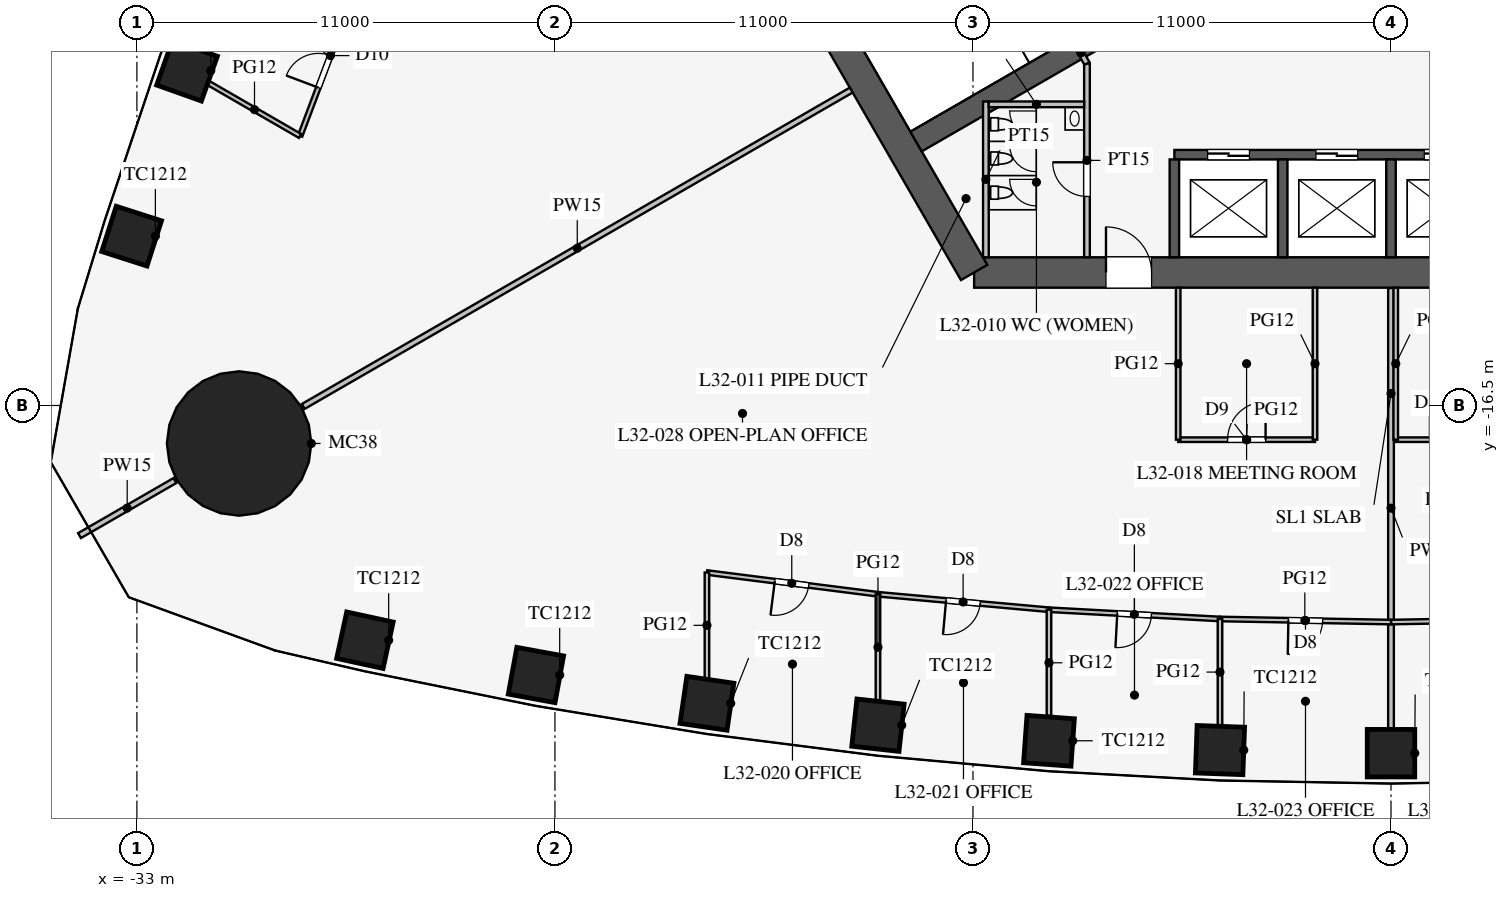
"""IFC4 building model, lengths in metres.
Left out: names, types, materials, properties, quantities, classifications, styles, units other than length and angle.
Written with IfcOpenShell. Run it as: python <this file> out.ifc"""

import sys

from ifc_helpers import new_model, si_unit, direction, frame, frame_2d, origin, origin_2d, place, context, subcontext, project, spatial, rectangle, circle, extrude, element, fill, save


model = new_model("IFC4")
c1 = context("Model", 3, precision=1e-05, world=origin(), true_north=direction((0.0, 1.0)))
c2 = subcontext(c1, "Body", "Model", "MODEL_VIEW")
j1 = project(units=[si_unit("LENGTHUNIT", "METRE"), si_unit("PLANEANGLEUNIT", "RADIAN")], contexts=[c1])
p1 = place(None, origin())
s1 = spatial("IfcSite", under=j1, at=p1, CompositionType="ELEMENT")
p2 = place(p1, origin())
s2 = spatial("IfcBuilding", under=s1, at=p2, CompositionType="ELEMENT")
p3 = place(p2, frame((0.0, 0.0, 140.9)))
s3 = spatial("IfcBuildingStorey", under=s2, at=p3, CompositionType="ELEMENT", Elevation=140.9)
for number, where, z_axis, x_axis in (
    (1, (-27.0, -22.677, 0.0), (0.0, 0.0, 1.0), (0.977, -0.212, 0.0)),
    (2, (-22.5, -23.593, 0.0), (0.0, 0.0, 1.0), (0.984, -0.18, 0.0)),
    (3, (-18.0, -24.337, 0.0), (0.0, 0.0, 1.0), (0.99, -0.144, 0.0)),
    (4, (-13.5, -24.913, 0.0), (0.0, 0.0, 1.0), (0.994, -0.108, 0.0)),
    (5, (-9.0, -25.323, 0.0), (0.0, 0.0, 1.0), (0.997, -0.072, 0.0)),
    (6, (-4.5, -25.568, 0.0), (0.0, 0.0, 1.0), (0.999, -0.036, 0.0)),
    (7, (0.0, -25.65, 0.0), (0.0, 0.0, 1.0), (1.0, 0.0, 0.0)),
    (8, (-31.682, -7.689, 0.0), (0.0, 0.0, 1.0), (-0.336, -0.942, 0.0)),
    (9, (-33.139, -12.044, 0.0), (0.0, 0.0, 1.0), (-0.305, -0.952, 0.0)),
):
    element("IfcColumn", number, at=place(p3, frame(where, z_axis=z_axis, x_axis=x_axis)), inside=s3, PredefinedType="COLUMN", context=c2, shape_type="SweptSolid", body=[
        extrude(rectangle(XDim=1.25, YDim=1.25, at=origin_2d()), origin(), (0.0, 0.0, 1.0), 4.2),
    ])
p4 = place(p3, frame((-30.311, -17.5, 0.0), z_axis=(0.0, 0.0, 1.0), x_axis=(1.0, 0.0, 0.0)))
e10 = element("IfcColumn", 10, at=p4, inside=s3, PredefinedType="COLUMN", context=c2, shape_type="SweptSolid", body=[
    extrude(circle(Radius=1.9, at=origin_2d()), origin(), (0.0, 0.0, 1.0), 4.2),
])
p5 = place(p3, frame((-10.97, -13.0, 0.0), z_axis=(0.0, 0.0, 1.0), x_axis=(1.0, 0.0, 0.0)))
e11 = element("IfcWall", 11, at=p5, inside=s3, PredefinedType="SHEAR", context=c2, shape_type="SweptSolid", body=[
    extrude(rectangle(XDim=21.939, YDim=0.8, at=frame_2d((10.97, 0.0))), origin(), (0.0, 0.0, 1.0), 4.2),
])
p6 = place(p5, frame((17.27, 0.0, 0.0)))
e12 = element("IfcOpeningElement", 12, at=p6, cuts=e11, PredefinedType="OPENING", context=c2, shape_type="SweptSolid", body=[
    extrude(rectangle(XDim=1.2, YDim=2.1, at=frame_2d((0.6, 1.05))), frame((0.0, 0.41, 0.0), z_axis=(0.0, -1.0, 0.0), x_axis=(1.0, 0.0, 0.0)), (0.0, 0.0, 1.0), 0.82),
])
p7 = place(p5, frame((3.47, 0.0, 0.0)))
e13 = element("IfcOpeningElement", 13, at=p7, cuts=e11, PredefinedType="OPENING", context=c2, shape_type="SweptSolid", body=[
    extrude(rectangle(XDim=1.2, YDim=2.1, at=frame_2d((0.6, 1.05))), frame((0.0, 0.41, 0.0), z_axis=(0.0, -1.0, 0.0), x_axis=(1.0, 0.0, 0.0)), (0.0, 0.0, 1.0), 0.82),
])
p8 = place(p3, frame((-16.743, -3.0, 0.0), z_axis=(0.0, 0.0, 1.0), x_axis=(0.499995765644, -0.866027848477, 0.0)))
e14 = element("IfcWall", 14, at=p8, inside=s3, PredefinedType="SHEAR", context=c2, shape_type="SweptSolid", body=[
    extrude(rectangle(XDim=11.547, YDim=0.8, at=frame_2d((5.773, 0.0))), origin(), (0.0, 0.0, 1.0), 4.2),
])
p9 = place(p3, frame((-5.7, -9.9, 0.0), z_axis=(0.0, 0.0, 1.0), x_axis=(1.0, 0.0, 0.0)))
e15 = element("IfcWall", 15, at=p9, inside=s3, PredefinedType="SHEAR", context=c2, shape_type="SweptSolid", body=[
    extrude(rectangle(XDim=11.4, YDim=0.25, at=frame_2d((5.7, 0.0))), origin(), (0.0, 0.0, 1.0), 4.2),
])
p10 = place(p9, frame((0.875, 0.0, 0.0)))
e16 = element("IfcOpeningElement", 16, at=p10, cuts=e15, PredefinedType="OPENING", context=c2, shape_type="SweptSolid", body=[
    extrude(rectangle(XDim=1.1, YDim=2.2, at=frame_2d((0.55, 1.1))), frame((0.0, 0.135, 0.0), z_axis=(0.0, -1.0, 0.0), x_axis=(1.0, 0.0, 0.0)), (0.0, 0.0, 1.0), 0.27),
])
p11 = place(p9, frame((3.725, 0.0, 0.0)))
e17 = element("IfcOpeningElement", 17, at=p11, cuts=e15, PredefinedType="OPENING", context=c2, shape_type="SweptSolid", body=[
    extrude(rectangle(XDim=1.1, YDim=2.2, at=frame_2d((0.55, 1.1))), frame((0.0, 0.135, 0.0), z_axis=(0.0, -1.0, 0.0), x_axis=(1.0, 0.0, 0.0)), (0.0, 0.0, 1.0), 0.27),
])
p12 = place(p9, frame((6.575, 0.0, 0.0)))
e18 = element("IfcOpeningElement", 18, at=p12, cuts=e15, PredefinedType="OPENING", context=c2, shape_type="SweptSolid", body=[
    extrude(rectangle(XDim=1.1, YDim=2.2, at=frame_2d((0.55, 1.1))), frame((0.0, 0.135, 0.0), z_axis=(0.0, -1.0, 0.0), x_axis=(1.0, 0.0, 0.0)), (0.0, 0.0, 1.0), 0.27),
])
p13 = place(p9, frame((9.425, 0.0, 0.0)))
e19 = element("IfcOpeningElement", 19, at=p13, cuts=e15, PredefinedType="OPENING", context=c2, shape_type="SweptSolid", body=[
    extrude(rectangle(XDim=1.1, YDim=2.2, at=frame_2d((0.55, 1.1))), frame((0.0, 0.135, 0.0), z_axis=(0.0, -1.0, 0.0), x_axis=(1.0, 0.0, 0.0)), (0.0, 0.0, 1.0), 0.27),
])
for number, where, z_axis, x_axis in (
    (20, (-5.7, -10.025, 0.0), (0.0, 0.0, 1.0), (0.0, -1.0, 0.0)),
    (21, (-2.85, -10.025, 0.0), (0.0, 0.0, 1.0), (0.0, -1.0, 0.0)),
    (22, (0.0, -10.025, 0.0), (0.0, 0.0, 1.0), (0.0, -1.0, 0.0)),
):
    element("IfcWall", number, at=place(p3, frame(where, z_axis=z_axis, x_axis=x_axis)), inside=s3, PredefinedType="SHEAR", context=c2, shape_type="SweptSolid", body=[
        extrude(rectangle(XDim=2.575, YDim=0.25, at=frame_2d((1.288, 0.0))), origin(), (0.0, 0.0, 1.0), 4.2),
    ])
p14 = place(p3, frame((-4.638, -5.016, 0.0), z_axis=(0.0, 0.0, 1.0), x_axis=(-0.866019375473, -0.500010441196, 0.0)))
e23 = element("IfcWall", 23, at=p14, inside=s3, PredefinedType="SHEAR", context=c2, shape_type="SweptSolid", body=[
    extrude(rectangle(XDim=9.075, YDim=0.6, at=frame_2d((4.538, 0.0))), origin(), (0.0, 0.0, 1.0), 4.2),
])
p15 = place(p3, frame((-8.0, -7.5, 0.0), z_axis=(0.0, 0.0, 1.0), x_axis=(0.0, -1.0, 0.0)))
e24 = element("IfcWall", 24, at=p15, inside=s3, PredefinedType="PARTITIONING", context=c2, shape_type="SweptSolid", body=[
    extrude(rectangle(XDim=5.1, YDim=0.15, at=frame_2d((2.55, 0.0))), origin(), (0.0, 0.0, 1.0), 4.0),
])
p16 = place(p15, frame((2.6, 0.0, 0.0)))
e25 = element("IfcOpeningElement", 25, at=p16, cuts=e24, PredefinedType="OPENING", context=c2, shape_type="SweptSolid", body=[
    extrude(rectangle(XDim=0.9, YDim=2.1, at=frame_2d((0.45, 1.05))), frame((0.0, 0.085, 0.0), z_axis=(0.0, -1.0, 0.0), x_axis=(1.0, 0.0, 0.0)), (0.0, 0.0, 1.0), 0.17),
])
p17 = place(p3, frame((-8.0, -7.5, 0.0), z_axis=(0.0, 0.0, 1.0), x_axis=(-0.499842556608, 0.866116284689, 0.0)))
e26 = element("IfcWall", 26, at=p17, inside=s3, PredefinedType="PARTITIONING", context=c2, shape_type="SweptSolid", body=[
    extrude(rectangle(XDim=0.645, YDim=0.15, at=frame_2d((0.323, 0.0))), origin(), (0.0, 0.0, 1.0), 4.0),
])
p18 = place(p3, frame((-10.66, -8.5, 0.0), z_axis=(0.0, 0.0, 1.0), x_axis=(0.0, -1.0, 0.0)))
e27 = element("IfcWall", 27, at=p18, inside=s3, PredefinedType="PARTITIONING", context=c2, shape_type="SweptSolid", body=[
    extrude(rectangle(XDim=4.1, YDim=0.15, at=frame_2d((2.05, 0.0))), origin(), (0.0, 0.0, 1.0), 4.0),
])
p19 = place(p3, frame((-8.075, -8.575, 0.0), z_axis=(0.0, 0.0, 1.0), x_axis=(-1.0, 0.0, 0.0)))
e28 = element("IfcWall", 28, at=p19, inside=s3, PredefinedType="PARTITIONING", context=c2, shape_type="SweptSolid", body=[
    extrude(rectangle(XDim=2.51, YDim=0.15, at=frame_2d((1.255, 0.0))), origin(), (0.0, 0.0, 1.0), 4.0),
])
p20 = place(p3, frame((-14.203, -8.2, 0.0), z_axis=(0.0, 0.0, 1.0), x_axis=(-0.866024668836, -0.500001272966, 0.0)))
e29 = element("IfcWall", 29, at=p20, inside=s3, PredefinedType="PARTITIONING", context=c2, shape_type="SweptSolid", body=[
    extrude(rectangle(XDim=16.65, YDim=0.15, at=frame_2d((8.325, 0.0))), origin(), (0.0, 0.0, 1.0), 2.3),
])
p21 = place(p3, frame((-32.0, -18.475, 0.0), z_axis=(0.0, 0.0, 1.0), x_axis=(-0.866042548026, -0.499970304126, 0.0)))
e30 = element("IfcWall", 30, at=p21, inside=s3, PredefinedType="PARTITIONING", context=c2, shape_type="SweptSolid", body=[
    extrude(rectangle(XDim=2.899, YDim=0.15, at=frame_2d((1.45, 0.0))), origin(), (0.0, 0.0, 1.0), 2.3),
])
p22 = place(p3, frame((0.0, -13.41, 0.0), z_axis=(0.0, 0.0, 1.0), x_axis=(0.0, -1.0, 0.0)))
e31 = element("IfcWall", 31, at=p22, inside=s3, PredefinedType="PARTITIONING", context=c2, shape_type="SweptSolid", body=[
    extrude(rectangle(XDim=11.585, YDim=0.15, at=frame_2d((5.792, 0.0))), origin(), (0.0, 0.0, 1.0), 3.2),
])
p23 = place(p3, frame((0.125, -17.4, 0.0), z_axis=(0.0, 0.0, 1.0), x_axis=(1.0, 0.0, 0.0)))
e32 = element("IfcWall", 32, at=p23, inside=s3, PredefinedType="PARTITIONING", context=c2, shape_type="SweptSolid", body=[
    extrude(rectangle(XDim=2.7, YDim=0.12, at=frame_2d((1.35, 0.0))), origin(), (0.0, 0.0, 1.0), 2.9),
])
p24 = place(p23, frame((0.9, 0.0, 0.15)))
e33 = element("IfcOpeningElement", 33, at=p24, cuts=e32, PredefinedType="OPENING", context=c2, shape_type="SweptSolid", body=[
    extrude(rectangle(XDim=0.9, YDim=2.1, at=frame_2d((0.45, 1.05))), frame((0.0, 0.07, 0.0), z_axis=(0.0, -1.0, 0.0), x_axis=(1.0, 0.0, 0.0)), (0.0, 0.0, 1.0), 0.14),
])
p25 = place(p3, frame((-5.6, -17.4, 0.0), z_axis=(0.0, 0.0, 1.0), x_axis=(1.0, 0.0, 0.0)))
e34 = element("IfcWall", 34, at=p25, inside=s3, PredefinedType="PARTITIONING", context=c2, shape_type="SweptSolid", body=[
    extrude(rectangle(XDim=3.6, YDim=0.12, at=frame_2d((1.8, 0.0))), origin(), (0.0, 0.0, 1.0), 2.9),
])
p26 = place(p25, frame((1.3, 0.0, 0.15)))
e35 = element("IfcOpeningElement", 35, at=p26, cuts=e34, PredefinedType="OPENING", context=c2, shape_type="SweptSolid", body=[
    extrude(rectangle(XDim=1.0, YDim=2.1, at=frame_2d((0.5, 1.05))), frame((0.0, 0.07, 0.0), z_axis=(0.0, -1.0, 0.0), x_axis=(1.0, 0.0, 0.0)), (0.0, 0.0, 1.0), 0.14),
])
for number, where, z_axis, x_axis in (
    (36, (0.125, -13.4, 0.0), (0.0, 0.0, 1.0), (0.0, -1.0, 0.0)),
    (37, (-2.0, -13.4, 0.0), (0.0, 0.0, 1.0), (0.0, -1.0, 0.0)),
    (38, (-5.6, -13.4, 0.0), (0.0, 0.0, 1.0), (0.0, -1.0, 0.0)),
):
    element("IfcWall", number, at=place(p3, frame(where, z_axis=z_axis, x_axis=x_axis)), inside=s3, PredefinedType="PARTITIONING", context=c2, shape_type="SweptSolid", body=[
        extrude(rectangle(XDim=4.0, YDim=0.12, at=frame_2d((2.0, 0.0))), origin(), (0.0, 0.0, 1.0), 2.9),
    ])
p27 = place(p3, frame((0.0, -22.2, 0.0), z_axis=(0.0, 0.0, 1.0), x_axis=(0.999837820638, 0.018009231578, 0.0)))
e39 = element("IfcWall", 39, at=p27, inside=s3, PredefinedType="PARTITIONING", context=c2, shape_type="SweptSolid", body=[
    extrude(rectangle(XDim=4.501, YDim=0.12, at=frame_2d((2.25, 0.0))), origin(), (0.0, 0.0, 1.0), 2.9),
])
p28 = place(p27, frame((1.8, 0.0, 0.15)))
e40 = element("IfcOpeningElement", 40, at=p28, cuts=e39, PredefinedType="OPENING", context=c2, shape_type="SweptSolid", body=[
    extrude(rectangle(XDim=0.9, YDim=2.1, at=frame_2d((0.45, 1.05))), frame((0.0, 0.07, 0.0), z_axis=(0.0, -1.0, 0.0), x_axis=(1.0, 0.0, 0.0)), (0.0, 0.0, 1.0), 0.14),
])
p29 = place(p3, frame((-13.5, -21.468, 0.0), z_axis=(0.0, 0.0, 1.0), x_axis=(0.995930325215, -0.090126507295, 0.0)))
e41 = element("IfcWall", 41, at=p29, inside=s3, PredefinedType="PARTITIONING", context=c2, shape_type="SweptSolid", body=[
    extrude(rectangle(XDim=4.518, YDim=0.12, at=frame_2d((2.259, 0.0))), origin(), (0.0, 0.0, 1.0), 2.9),
])
p30 = place(p29, frame((1.8, 0.0, 0.15)))
e42 = element("IfcOpeningElement", 42, at=p30, cuts=e41, PredefinedType="OPENING", context=c2, shape_type="SweptSolid", body=[
    extrude(rectangle(XDim=0.9, YDim=2.1, at=frame_2d((0.45, 1.05))), frame((0.0, 0.07, 0.0), z_axis=(0.0, -1.0, 0.0), x_axis=(1.0, 0.0, 0.0)), (0.0, 0.0, 1.0), 0.14),
])
p31 = place(p3, frame((-18.0, -20.896, 0.0), z_axis=(0.0, 0.0, 1.0), x_axis=(0.992010652594, -0.12615413247, 0.0)))
e43 = element("IfcWall", 43, at=p31, inside=s3, PredefinedType="PARTITIONING", context=c2, shape_type="SweptSolid", body=[
    extrude(rectangle(XDim=4.536, YDim=0.12, at=frame_2d((2.268, 0.0))), origin(), (0.0, 0.0, 1.0), 2.9),
])
p32 = place(p31, frame((1.8, 0.0, 0.15)))
e44 = element("IfcOpeningElement", 44, at=p32, cuts=e43, PredefinedType="OPENING", context=c2, shape_type="SweptSolid", body=[
    extrude(rectangle(XDim=0.9, YDim=2.1, at=frame_2d((0.45, 1.05))), frame((0.0, 0.07, 0.0), z_axis=(0.0, -1.0, 0.0), x_axis=(1.0, 0.0, 0.0)), (0.0, 0.0, 1.0), 0.14),
])
p33 = place(p3, frame((-4.5, -22.119, 0.0), z_axis=(0.0, 0.0, 1.0), x_axis=(0.999837820638, -0.018009231578, 0.0)))
e45 = element("IfcWall", 45, at=p33, inside=s3, PredefinedType="PARTITIONING", context=c2, shape_type="SweptSolid", body=[
    extrude(rectangle(XDim=4.501, YDim=0.12, at=frame_2d((2.25, 0.0))), origin(), (0.0, 0.0, 1.0), 2.9),
])
p34 = place(p33, frame((1.8, 0.0, 0.15)))
e46 = element("IfcOpeningElement", 46, at=p34, cuts=e45, PredefinedType="OPENING", context=c2, shape_type="SweptSolid", body=[
    extrude(rectangle(XDim=0.9, YDim=2.1, at=frame_2d((0.45, 1.05))), frame((0.0, 0.07, 0.0), z_axis=(0.0, -1.0, 0.0), x_axis=(1.0, 0.0, 0.0)), (0.0, 0.0, 1.0), 0.14),
])
p35 = place(p3, frame((-9.0, -21.875, 0.0), z_axis=(0.0, 0.0, 1.0), x_axis=(0.998537376538, -0.054065771581, 0.0)))
e47 = element("IfcWall", 47, at=p35, inside=s3, PredefinedType="PARTITIONING", context=c2, shape_type="SweptSolid", body=[
    extrude(rectangle(XDim=4.507, YDim=0.12, at=frame_2d((2.253, 0.0))), origin(), (0.0, 0.0, 1.0), 2.9),
])
p36 = place(p35, frame((1.8, 0.0, 0.15)))
e48 = element("IfcOpeningElement", 48, at=p36, cuts=e47, PredefinedType="OPENING", context=c2, shape_type="SweptSolid", body=[
    extrude(rectangle(XDim=0.9, YDim=2.1, at=frame_2d((0.45, 1.05))), frame((0.0, 0.07, 0.0), z_axis=(0.0, -1.0, 0.0), x_axis=(1.0, 0.0, 0.0)), (0.0, 0.0, 1.0), 0.14),
])
p37 = place(p3, frame((-13.5, -21.468, 0.0), z_axis=(0.0, 0.0, 1.0), x_axis=(0.0, -1.0, 0.0)))
e49 = element("IfcWall", 49, at=p37, inside=s3, PredefinedType="PARTITIONING", context=c2, shape_type="SweptSolid", body=[
    extrude(rectangle(XDim=2.787, YDim=0.12, at=frame_2d((1.393, 0.0))), origin(), (0.0, 0.0, 1.0), 2.9),
])
p38 = place(p3, frame((-18.0, -20.896, 0.0), z_axis=(0.0, 0.0, 1.0), x_axis=(0.0, -1.0, 0.0)))
e50 = element("IfcWall", 50, at=p38, inside=s3, PredefinedType="PARTITIONING", context=c2, shape_type="SweptSolid", body=[
    extrude(rectangle(XDim=2.78, YDim=0.12, at=frame_2d((1.39, 0.0))), origin(), (0.0, 0.0, 1.0), 2.9),
])
p39 = place(p3, frame((-4.5, -22.119, 0.0), z_axis=(0.0, 0.0, 1.0), x_axis=(0.0, -1.0, 0.0)))
e51 = element("IfcWall", 51, at=p39, inside=s3, PredefinedType="PARTITIONING", context=c2, shape_type="SweptSolid", body=[
    extrude(rectangle(XDim=2.794, YDim=0.12, at=frame_2d((1.397, 0.0))), origin(), (0.0, 0.0, 1.0), 2.9),
])
p40 = place(p3, frame((-9.0, -21.875, 0.0), z_axis=(0.0, 0.0, 1.0), x_axis=(0.0, -1.0, 0.0)))
e52 = element("IfcWall", 52, at=p40, inside=s3, PredefinedType="PARTITIONING", context=c2, shape_type="SweptSolid", body=[
    extrude(rectangle(XDim=2.791, YDim=0.12, at=frame_2d((1.396, 0.0))), origin(), (0.0, 0.0, 1.0), 2.9),
])
p41 = place(p3, frame((-27.096, -5.141, 0.0), z_axis=(0.0, 0.0, 1.0), x_axis=(-0.352894560512, -0.93566309597, 0.0)))
e53 = element("IfcWall", 53, at=p41, inside=s3, PredefinedType="PARTITIONING", context=c2, shape_type="SweptSolid", body=[
    extrude(rectangle(XDim=4.561, YDim=0.12, at=frame_2d((2.28, 0.0))), origin(), (0.0, 0.0, 1.0), 2.9),
])
p42 = place(p41, frame((1.4, 0.0, 0.15)))
e54 = element("IfcOpeningElement", 54, at=p42, cuts=e53, PredefinedType="OPENING", context=c2, shape_type="SweptSolid", body=[
    extrude(rectangle(XDim=1.8, YDim=2.1, at=frame_2d((0.9, 1.05))), frame((0.0, 0.07, 0.0), z_axis=(0.0, -1.0, 0.0), x_axis=(1.0, 0.0, 0.0)), (0.0, 0.0, 1.0), 0.14),
])
p43 = place(p3, frame((-28.706, -9.408, 0.0), z_axis=(0.0, 0.0, 1.0), x_axis=(-0.866016849815, 0.500014815617, 0.0)))
e55 = element("IfcWall", 55, at=p43, inside=s3, PredefinedType="PARTITIONING", context=c2, shape_type="SweptSolid", body=[
    extrude(rectangle(XDim=2.771, YDim=0.12, at=frame_2d((1.385, 0.0))), origin(), (0.0, 0.0, 1.0), 2.9),
])
p44 = place(p16, frame((0.9, 0.0, 0.0), z_axis=(0.0, 0.0, 1.0), x_axis=(-1.0, 0.0, 0.0)))
e56 = element("IfcDoor", 56, at=p44, inside=s3, OperationType="SINGLE_SWING_RIGHT", PredefinedType="DOOR", context=c2, shape_type="SweptSolid", body=[
    extrude(rectangle(XDim=0.9, YDim=2.1, at=frame_2d((0.45, 1.05))), frame((0.0, 0.025, 0.0), z_axis=(0.0, -1.0, 0.0), x_axis=(1.0, 0.0, 0.0)), (0.0, 0.0, 1.0), 0.05),
])
fill(e25, e56)
p45 = place(p7, origin())
e57 = element("IfcDoor", 57, at=p45, inside=s3, OperationType="SINGLE_SWING_LEFT", PredefinedType="DOOR", context=c2, shape_type="SweptSolid", body=[
    extrude(rectangle(XDim=1.2, YDim=2.1, at=frame_2d((0.6, 1.05))), frame((0.0, 0.025, 0.0), z_axis=(0.0, -1.0, 0.0), x_axis=(1.0, 0.0, 0.0)), (0.0, 0.0, 1.0), 0.05),
])
fill(e13, e57)
p46 = place(p26, origin())
e58 = element("IfcDoor", 58, at=p46, inside=s3, OperationType="SINGLE_SWING_RIGHT", PredefinedType="DOOR", context=c2, shape_type="SweptSolid", body=[
    extrude(rectangle(XDim=1.0, YDim=2.1, at=frame_2d((0.5, 1.05))), frame((0.0, 0.025, 0.0), z_axis=(0.0, -1.0, 0.0), x_axis=(1.0, 0.0, 0.0)), (0.0, 0.0, 1.0), 0.05),
])
fill(e35, e58)
p47 = place(p32, frame((0.9, 0.0, 0.0), z_axis=(0.0, 0.0, 1.0), x_axis=(-1.0, 0.0, 0.0)))
e59 = element("IfcDoor", 59, at=p47, inside=s3, OperationType="SINGLE_SWING_RIGHT", PredefinedType="DOOR", context=c2, shape_type="SweptSolid", body=[
    extrude(rectangle(XDim=0.9, YDim=2.1, at=frame_2d((0.45, 1.05))), frame((0.0, 0.025, 0.0), z_axis=(0.0, -1.0, 0.0), x_axis=(1.0, 0.0, 0.0)), (0.0, 0.0, 1.0), 0.05),
])
fill(e44, e59)
p48 = place(p30, frame((0.9, 0.0, 0.0), z_axis=(0.0, 0.0, 1.0), x_axis=(-1.0, 0.0, 0.0)))
e60 = element("IfcDoor", 60, at=p48, inside=s3, OperationType="SINGLE_SWING_RIGHT", PredefinedType="DOOR", context=c2, shape_type="SweptSolid", body=[
    extrude(rectangle(XDim=0.9, YDim=2.1, at=frame_2d((0.45, 1.05))), frame((0.0, 0.025, 0.0), z_axis=(0.0, -1.0, 0.0), x_axis=(1.0, 0.0, 0.0)), (0.0, 0.0, 1.0), 0.05),
])
fill(e42, e60)
p49 = place(p36, frame((0.9, 0.0, 0.0), z_axis=(0.0, 0.0, 1.0), x_axis=(-1.0, 0.0, 0.0)))
e61 = element("IfcDoor", 61, at=p49, inside=s3, OperationType="SINGLE_SWING_RIGHT", PredefinedType="DOOR", context=c2, shape_type="SweptSolid", body=[
    extrude(rectangle(XDim=0.9, YDim=2.1, at=frame_2d((0.45, 1.05))), frame((0.0, 0.025, 0.0), z_axis=(0.0, -1.0, 0.0), x_axis=(1.0, 0.0, 0.0)), (0.0, 0.0, 1.0), 0.05),
])
fill(e48, e61)
p50 = place(p34, frame((0.9, 0.0, 0.0), z_axis=(0.0, 0.0, 1.0), x_axis=(-1.0, 0.0, 0.0)))
e62 = element("IfcDoor", 62, at=p50, inside=s3, OperationType="SINGLE_SWING_RIGHT", PredefinedType="DOOR", context=c2, shape_type="SweptSolid", body=[
    extrude(rectangle(XDim=0.9, YDim=2.1, at=frame_2d((0.45, 1.05))), frame((0.0, 0.025, 0.0), z_axis=(0.0, -1.0, 0.0), x_axis=(1.0, 0.0, 0.0)), (0.0, 0.0, 1.0), 0.05),
])
fill(e46, e62)
p51 = place(p42, frame((1.8, 0.0, 0.0), z_axis=(0.0, 0.0, 1.0), x_axis=(-1.0, 0.0, 0.0)))
e63 = element("IfcDoor", 63, at=p51, inside=s3, OperationType="DOUBLE_DOOR_SINGLE_SWING", PredefinedType="DOOR", context=c2, shape_type="SweptSolid", body=[
    extrude(rectangle(XDim=1.8, YDim=2.1, at=frame_2d((0.9, 1.05))), frame((0.0, 0.025, 0.0), z_axis=(0.0, -1.0, 0.0), x_axis=(1.0, 0.0, 0.0)), (0.0, 0.0, 1.0), 0.05),
])
fill(e54, e63)
p52 = place(p10, origin())
e64 = element("IfcDoor", 64, at=p52, inside=s3, OperationType="DOUBLE_DOOR_SLIDING", PredefinedType="DOOR", context=c2, shape_type="SweptSolid", body=[
    extrude(rectangle(XDim=1.1, YDim=2.2, at=frame_2d((0.55, 1.1))), frame((0.0, 0.025, 0.0), z_axis=(0.0, -1.0, 0.0), x_axis=(1.0, 0.0, 0.0)), (0.0, 0.0, 1.0), 0.05),
])
fill(e16, e64)
p53 = place(p11, origin())
e65 = element("IfcDoor", 65, at=p53, inside=s3, OperationType="DOUBLE_DOOR_SLIDING", PredefinedType="DOOR", context=c2, shape_type="SweptSolid", body=[
    extrude(rectangle(XDim=1.1, YDim=2.2, at=frame_2d((0.55, 1.1))), frame((0.0, 0.025, 0.0), z_axis=(0.0, -1.0, 0.0), x_axis=(1.0, 0.0, 0.0)), (0.0, 0.0, 1.0), 0.05),
])
fill(e17, e65)
p54 = place(p12, origin())
e66 = element("IfcDoor", 66, at=p54, inside=s3, OperationType="DOUBLE_DOOR_SLIDING", PredefinedType="DOOR", context=c2, shape_type="SweptSolid", body=[
    extrude(rectangle(XDim=1.1, YDim=2.2, at=frame_2d((0.55, 1.1))), frame((0.0, 0.025, 0.0), z_axis=(0.0, -1.0, 0.0), x_axis=(1.0, 0.0, 0.0)), (0.0, 0.0, 1.0), 0.05),
])
fill(e18, e66)
save(model, sys.argv[1])
